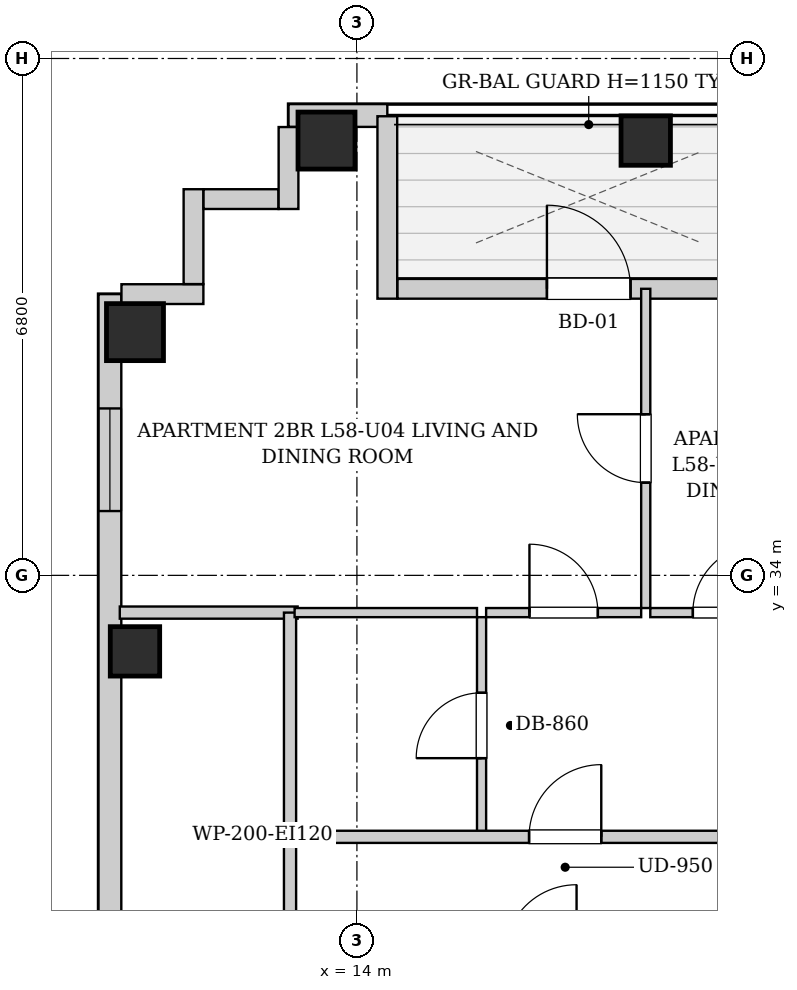
"""IFC4 building model, lengths in metres.
Left out: names, types, materials, properties, quantities, classifications, styles, units other than length and angle.
Written with IfcOpenShell. Run it as: python <this file> out.ifc"""

import sys

from ifc_helpers import new_model, si_unit, direction, frame, frame_2d, origin, origin_2d, place, context, subcontext, project, spatial, rectangle, extrude, element, fill, save


model = new_model("IFC4")
c1 = context("Model", 3, precision=1e-05, world=origin(), true_north=direction((0.0, 1.0)))
c2 = subcontext(c1, "Body", "Model", "MODEL_VIEW")
j1 = project(units=[si_unit("LENGTHUNIT", "METRE"), si_unit("PLANEANGLEUNIT", "RADIAN")], contexts=[c1])
p1 = place(None, origin())
s1 = spatial("IfcSite", under=j1, at=p1, CompositionType="ELEMENT")
p2 = place(p1, origin())
s2 = spatial("IfcBuilding", under=s1, at=p2, CompositionType="ELEMENT")
p3 = place(p2, frame((0.0, 0.0, 200.8)))
s3 = spatial("IfcBuildingStorey", under=s2, at=p3, CompositionType="ELEMENT", Elevation=200.8)
p4 = place(p3, frame((13.6, 39.72, 0.0), z_axis=(0.0, 0.0, 1.0), x_axis=(1.0, 0.0, 0.0)))
e1 = element("IfcColumn", 1, at=p4, inside=s3, PredefinedType="COLUMN", context=c2, shape_type="SweptSolid", body=[
    extrude(rectangle(XDim=0.75, YDim=0.75, at=origin_2d()), origin(), (0.0, 0.0, 1.0), 3.3),
])
for number, where, z_axis, x_axis in (
    (2, (17.8, 39.72, 0.0), (0.0, 0.0, 1.0), (1.0, 0.0, 0.0)),
    (3, (11.08, 33.0, 0.0), (0.0, 0.0, 1.0), (1.0, 0.0, 0.0)),
):
    element("IfcColumn", number, at=place(p3, frame(where, z_axis=z_axis, x_axis=x_axis)), inside=s3, PredefinedType="COLUMN", context=c2, shape_type="SweptSolid", body=[
        extrude(rectangle(XDim=0.65, YDim=0.65, at=origin_2d()), origin(), (0.0, 0.0, 1.0), 3.3),
    ])
p5 = place(p3, frame((11.08, 37.2, 0.0), z_axis=(0.0, 0.0, 1.0), x_axis=(1.0, 0.0, 0.0)))
e4 = element("IfcColumn", 4, at=p5, inside=s3, PredefinedType="COLUMN", context=c2, shape_type="SweptSolid", body=[
    extrude(rectangle(XDim=0.75, YDim=0.75, at=origin_2d()), origin(), (0.0, 0.0, 1.0), 3.3),
])
p6 = place(p3, frame((13.1, 40.05, 0.0), z_axis=(0.0, 0.0, 1.0), x_axis=(1.0, 0.0, 0.0)))
e5 = element("IfcWall", 5, at=p6, inside=s3, PredefinedType="SOLIDWALL", context=c2, shape_type="SweptSolid", body=[
    extrude(rectangle(XDim=1.3, YDim=0.3, at=frame_2d((0.65, 0.0))), origin(), (0.0, 0.0, 1.0), 3.04),
])
p7 = place(p3, frame((14.4, 40.04, 0.0), z_axis=(0.0, 0.0, 1.0), x_axis=(0.0, -1.0, 0.0)))
e6 = element("IfcWall", 6, at=p7, inside=s3, PredefinedType="SOLIDWALL", context=c2, shape_type="SweptSolid", body=[
    extrude(rectangle(XDim=2.4, YDim=0.26, at=frame_2d((1.2, 0.0))), origin(), (0.0, 0.0, 1.0), 3.04),
])
p8 = place(p3, frame((14.534, 37.77, 0.0), z_axis=(0.0, 0.0, 1.0), x_axis=(1.0, 0.0, 0.0)))
e7 = element("IfcWall", 7, at=p8, inside=s3, PredefinedType="SOLIDWALL", context=c2, shape_type="SweptSolid", body=[
    extrude(rectangle(XDim=5.032, YDim=0.26, at=frame_2d((2.516, 0.0))), origin(), (0.0, 0.0, 1.0), 3.04),
])
p9 = place(p8, frame((1.966, 0.0, 0.0)))
e8 = element("IfcOpeningElement", 8, at=p9, cuts=e7, PredefinedType="OPENING", context=c2, shape_type="SweptSolid", body=[
    extrude(rectangle(XDim=1.1, YDim=2.0, at=frame_2d((0.55, 1.0))), frame((0.0, 0.14, 0.0), z_axis=(0.0, -1.0, 0.0), x_axis=(1.0, 0.0, 0.0)), (0.0, 0.0, 1.0), 0.28),
])
p10 = place(p3, frame((10.75, 6.3, 0.0), z_axis=(0.0, 0.0, 1.0), x_axis=(0.0, 1.0, 0.0)))
e9 = element("IfcWall", 9, at=p10, inside=s3, PredefinedType="SOLIDWALL", context=c2, shape_type="SweptSolid", body=[
    extrude(rectangle(XDim=31.4, YDim=0.3, at=frame_2d((15.7, 0.0))), origin(), (0.0, 0.0, 1.0), 3.04),
])
p11 = place(p10, frame((1.504, 0.0, 0.55)))
e10 = element("IfcOpeningElement", 10, at=p11, cuts=e9, PredefinedType="OPENING", context=c2, shape_type="SweptSolid", body=[
    extrude(rectangle(XDim=1.35, YDim=1.2, at=frame_2d((0.675, 0.6))), frame((0.0, 0.16, 0.0), z_axis=(0.0, -1.0, 0.0), x_axis=(1.0, 0.0, 0.0)), (0.0, 0.0, 1.0), 0.32),
])
p12 = place(p10, frame((28.546, 0.0, 0.55)))
e11 = element("IfcOpeningElement", 11, at=p12, cuts=e9, PredefinedType="OPENING", context=c2, shape_type="SweptSolid", body=[
    extrude(rectangle(XDim=1.35, YDim=1.2, at=frame_2d((0.675, 0.6))), frame((0.0, 0.16, 0.0), z_axis=(0.0, -1.0, 0.0), x_axis=(1.0, 0.0, 0.0)), (0.0, 0.0, 1.0), 0.32),
])
p13 = place(p10, frame((11.85, 0.0, 0.55)))
e12 = element("IfcOpeningElement", 12, at=p13, cuts=e9, PredefinedType="OPENING", context=c2, shape_type="SweptSolid", body=[
    extrude(rectangle(XDim=1.35, YDim=1.2, at=frame_2d((0.675, 0.6))), frame((0.0, 0.16, 0.0), z_axis=(0.0, -1.0, 0.0), x_axis=(1.0, 0.0, 0.0)), (0.0, 0.0, 1.0), 0.32),
])
p14 = place(p10, frame((9.185, 0.0, 0.55)))
e13 = element("IfcOpeningElement", 13, at=p14, cuts=e9, PredefinedType="OPENING", context=c2, shape_type="SweptSolid", body=[
    extrude(rectangle(XDim=1.35, YDim=1.2, at=frame_2d((0.675, 0.6))), frame((0.0, 0.16, 0.0), z_axis=(0.0, -1.0, 0.0), x_axis=(1.0, 0.0, 0.0)), (0.0, 0.0, 1.0), 0.32),
])
p15 = place(p10, frame((19.006, 0.0, 0.55)))
e14 = element("IfcOpeningElement", 14, at=p15, cuts=e9, PredefinedType="OPENING", context=c2, shape_type="SweptSolid", body=[
    extrude(rectangle(XDim=1.35, YDim=1.2, at=frame_2d((0.675, 0.6))), frame((0.0, 0.16, 0.0), z_axis=(0.0, -1.0, 0.0), x_axis=(1.0, 0.0, 0.0)), (0.0, 0.0, 1.0), 0.32),
])
p16 = place(p10, frame((20.616, 0.0, 0.55)))
e15 = element("IfcOpeningElement", 15, at=p16, cuts=e9, PredefinedType="OPENING", context=c2, shape_type="SweptSolid", body=[
    extrude(rectangle(XDim=1.35, YDim=1.2, at=frame_2d((0.675, 0.6))), frame((0.0, 0.16, 0.0), z_axis=(0.0, -1.0, 0.0), x_axis=(1.0, 0.0, 0.0)), (0.0, 0.0, 1.0), 0.32),
])
p17 = place(p3, frame((10.902, 37.7, 0.0), z_axis=(0.0, 0.0, 1.0), x_axis=(1.0, 0.0, 0.0)))
e16 = element("IfcWall", 16, at=p17, inside=s3, PredefinedType="SOLIDWALL", context=c2, shape_type="SweptSolid", body=[
    extrude(rectangle(XDim=1.078, YDim=0.26, at=frame_2d((0.539, 0.0))), origin(), (0.0, 0.0, 1.0), 3.04),
])
p18 = place(p3, frame((11.85, 37.832, 0.0), z_axis=(0.0, 0.0, 1.0), x_axis=(0.0, 1.0, 0.0)))
e17 = element("IfcWall", 17, at=p18, inside=s3, PredefinedType="SOLIDWALL", context=c2, shape_type="SweptSolid", body=[
    extrude(rectangle(XDim=1.248, YDim=0.26, at=frame_2d((0.624, 0.0))), origin(), (0.0, 0.0, 1.0), 3.04),
])
p19 = place(p3, frame((11.982, 38.95, 0.0), z_axis=(0.0, 0.0, 1.0), x_axis=(1.0, 0.0, 0.0)))
e18 = element("IfcWall", 18, at=p19, inside=s3, PredefinedType="SOLIDWALL", context=c2, shape_type="SweptSolid", body=[
    extrude(rectangle(XDim=0.986, YDim=0.26, at=frame_2d((0.493, 0.0))), origin(), (0.0, 0.0, 1.0), 3.04),
])
p20 = place(p3, frame((13.1, 38.82, 0.0), z_axis=(0.0, 0.0, 1.0), x_axis=(0.0, 1.0, 0.0)))
e19 = element("IfcWall", 19, at=p20, inside=s3, PredefinedType="SOLIDWALL", context=c2, shape_type="SweptSolid", body=[
    extrude(rectangle(XDim=1.078, YDim=0.26, at=frame_2d((0.539, 0.0))), origin(), (0.0, 0.0, 1.0), 3.04),
])
p21 = place(p3, frame((13.12, 28.98, 0.0), z_axis=(0.0, 0.0, 1.0), x_axis=(0.0, 1.0, 0.0)))
e20 = element("IfcWall", 20, at=p21, inside=s3, PredefinedType="PARTITIONING", context=c2, shape_type="SweptSolid", body=[
    extrude(rectangle(XDim=1.58, YDim=0.16, at=frame_2d((0.79, 0.0))), origin(), (0.0, 0.0, 1.0), 3.04),
])
p22 = place(p3, frame((10.88, 33.51, 0.0), z_axis=(0.0, 0.0, 1.0), x_axis=(1.0, 0.0, 0.0)))
e21 = element("IfcWall", 21, at=p22, inside=s3, PredefinedType="PARTITIONING", context=c2, shape_type="SweptSolid", body=[
    extrude(rectangle(XDim=2.34, YDim=0.16, at=frame_2d((1.17, 0.0))), origin(), (0.0, 0.0, 1.0), 3.04),
])
p23 = place(p3, frame((13.12, 30.6, 0.0), z_axis=(0.0, 0.0, 1.0), x_axis=(0.0, 1.0, 0.0)))
e22 = element("IfcWall", 22, at=p23, inside=s3, PredefinedType="PARTITIONING", context=c2, shape_type="SweptSolid", body=[
    extrude(rectangle(XDim=2.91, YDim=0.16, at=frame_2d((1.455, 0.0))), origin(), (0.0, 0.0, 1.0), 3.04),
])
p24 = place(p3, frame((15.64, 30.6, 0.0), z_axis=(0.0, 0.0, 1.0), x_axis=(0.0, 1.0, 0.0)))
e23 = element("IfcWall", 23, at=p24, inside=s3, PredefinedType="PARTITIONING", context=c2, shape_type="SweptSolid", body=[
    extrude(rectangle(XDim=2.85, YDim=0.12, at=frame_2d((1.425, 0.0))), origin(), (0.0, 0.0, 1.0), 3.04),
])
p25 = place(p24, frame((0.995, 0.0, 0.0)))
e24 = element("IfcOpeningElement", 24, at=p25, cuts=e23, PredefinedType="OPENING", context=c2, shape_type="SweptSolid", body=[
    extrude(rectangle(XDim=0.86, YDim=2.05, at=frame_2d((0.43, 1.025))), frame((0.0, 0.07, 0.0), z_axis=(0.0, -1.0, 0.0), x_axis=(1.0, 0.0, 0.0)), (0.0, 0.0, 1.0), 0.14),
])
p26 = place(p3, frame((13.18, 33.51, 0.0), z_axis=(0.0, 0.0, 1.0), x_axis=(1.0, 0.0, 0.0)))
e25 = element("IfcWall", 25, at=p26, inside=s3, PredefinedType="PARTITIONING", context=c2, shape_type="SweptSolid", body=[
    extrude(rectangle(XDim=2.4, YDim=0.12, at=frame_2d((1.2, 0.0))), origin(), (0.0, 0.0, 1.0), 3.04),
])
p27 = place(p3, frame((15.7, 33.51, 0.0), z_axis=(0.0, 0.0, 1.0), x_axis=(1.0, 0.0, 0.0)))
e26 = element("IfcWall", 26, at=p27, inside=s3, PredefinedType="PARTITIONING", context=c2, shape_type="SweptSolid", body=[
    extrude(rectangle(XDim=2.04, YDim=0.12, at=frame_2d((1.02, 0.0))), origin(), (0.0, 0.0, 1.0), 3.04),
])
p28 = place(p27, frame((0.57, 0.0, 0.0)))
e27 = element("IfcOpeningElement", 27, at=p28, cuts=e26, PredefinedType="OPENING", context=c2, shape_type="SweptSolid", body=[
    extrude(rectangle(XDim=0.9, YDim=2.05, at=frame_2d((0.45, 1.025))), frame((0.0, 0.07, 0.0), z_axis=(0.0, -1.0, 0.0), x_axis=(1.0, 0.0, 0.0)), (0.0, 0.0, 1.0), 0.14),
])
p29 = place(p3, frame((17.86, 33.51, 0.0), z_axis=(0.0, 0.0, 1.0), x_axis=(1.0, 0.0, 0.0)))
e28 = element("IfcWall", 28, at=p29, inside=s3, PredefinedType="PARTITIONING", context=c2, shape_type="SweptSolid", body=[
    extrude(rectangle(XDim=2.02, YDim=0.12, at=frame_2d((1.01, 0.0))), origin(), (0.0, 0.0, 1.0), 3.04),
])
p30 = place(p29, frame((0.56, 0.0, 0.0)))
e29 = element("IfcOpeningElement", 29, at=p30, cuts=e28, PredefinedType="OPENING", context=c2, shape_type="SweptSolid", body=[
    extrude(rectangle(XDim=0.9, YDim=2.05, at=frame_2d((0.45, 1.025))), frame((0.0, 0.07, 0.0), z_axis=(0.0, -1.0, 0.0), x_axis=(1.0, 0.0, 0.0)), (0.0, 0.0, 1.0), 0.14),
])
p31 = place(p3, frame((17.8, 33.57, 0.0), z_axis=(0.0, 0.0, 1.0), x_axis=(0.0, 1.0, 0.0)))
e30 = element("IfcWall", 30, at=p31, inside=s3, PredefinedType="PARTITIONING", context=c2, shape_type="SweptSolid", body=[
    extrude(rectangle(XDim=4.2, YDim=0.12, at=frame_2d((2.1, 0.0))), origin(), (0.0, 0.0, 1.0), 2.556),
])
p32 = place(p31, frame((1.65, 0.0, 0.0)))
e31 = element("IfcOpeningElement", 31, at=p32, cuts=e30, PredefinedType="OPENING", context=c2, shape_type="SweptSolid", body=[
    extrude(rectangle(XDim=0.9, YDim=2.05, at=frame_2d((0.45, 1.025))), frame((0.0, 0.07, 0.0), z_axis=(0.0, -1.0, 0.0), x_axis=(1.0, 0.0, 0.0)), (0.0, 0.0, 1.0), 0.14),
])
p33 = place(p3, frame((13.15, 30.56, 0.0), z_axis=(0.0, 0.0, 1.0), x_axis=(1.0, 0.0, 0.0)))
e32 = element("IfcWall", 32, at=p33, inside=s3, PredefinedType="PARTITIONING", context=c2, shape_type="SweptSolid", body=[
    extrude(rectangle(XDim=24.6, YDim=0.16, at=frame_2d((12.3, 0.0))), origin(), (0.0, 0.0, 1.0), 3.04),
])
p34 = place(p33, frame((3.115, 0.0, 0.0)))
e33 = element("IfcOpeningElement", 33, at=p34, cuts=e32, PredefinedType="OPENING", context=c2, shape_type="SweptSolid", body=[
    extrude(rectangle(XDim=0.95, YDim=2.1, at=frame_2d((0.475, 1.05))), frame((0.0, 0.09, 0.0), z_axis=(0.0, -1.0, 0.0), x_axis=(1.0, 0.0, 0.0)), (0.0, 0.0, 1.0), 0.18),
])
p35 = place(p33, frame((21.55, 0.0, 0.0)))
e34 = element("IfcOpeningElement", 34, at=p35, cuts=e32, PredefinedType="OPENING", context=c2, shape_type="SweptSolid", body=[
    extrude(rectangle(XDim=0.95, YDim=2.1, at=frame_2d((0.475, 1.05))), frame((0.0, 0.09, 0.0), z_axis=(0.0, -1.0, 0.0), x_axis=(1.0, 0.0, 0.0)), (0.0, 0.0, 1.0), 0.18),
])
p36 = place(p25, origin())
e35 = element("IfcDoor", 35, at=p36, inside=s3, OperationType="SINGLE_SWING_LEFT", PredefinedType="DOOR", context=c2, shape_type="SweptSolid", body=[
    extrude(rectangle(XDim=0.86, YDim=2.05, at=frame_2d((0.43, 1.025))), frame((0.0, 0.025, 0.0), z_axis=(0.0, -1.0, 0.0), x_axis=(1.0, 0.0, 0.0)), (0.0, 0.0, 1.0), 0.05),
])
fill(e24, e35)
p37 = place(p28, origin())
e36 = element("IfcDoor", 36, at=p37, inside=s3, OperationType="SINGLE_SWING_LEFT", PredefinedType="DOOR", context=c2, shape_type="SweptSolid", body=[
    extrude(rectangle(XDim=0.9, YDim=2.05, at=frame_2d((0.45, 1.025))), frame((0.0, 0.025, 0.0), z_axis=(0.0, -1.0, 0.0), x_axis=(1.0, 0.0, 0.0)), (0.0, 0.0, 1.0), 0.05),
])
fill(e27, e36)
p38 = place(p30, origin())
e37 = element("IfcDoor", 37, at=p38, inside=s3, OperationType="SINGLE_SWING_RIGHT", PredefinedType="DOOR", context=c2, shape_type="SweptSolid", body=[
    extrude(rectangle(XDim=0.9, YDim=2.05, at=frame_2d((0.45, 1.025))), frame((0.0, 0.025, 0.0), z_axis=(0.0, -1.0, 0.0), x_axis=(1.0, 0.0, 0.0)), (0.0, 0.0, 1.0), 0.05),
])
fill(e29, e37)
p39 = place(p32, origin())
e38 = element("IfcDoor", 38, at=p39, inside=s3, OperationType="SINGLE_SWING_RIGHT", PredefinedType="DOOR", context=c2, shape_type="SweptSolid", body=[
    extrude(rectangle(XDim=0.9, YDim=2.05, at=frame_2d((0.45, 1.025))), frame((0.0, 0.025, 0.0), z_axis=(0.0, -1.0, 0.0), x_axis=(1.0, 0.0, 0.0)), (0.0, 0.0, 1.0), 0.05),
])
fill(e31, e38)
p40 = place(p34, origin())
e39 = element("IfcDoor", 39, at=p40, inside=s3, OperationType="SINGLE_SWING_RIGHT", PredefinedType="DOOR", context=c2, shape_type="SweptSolid", body=[
    extrude(rectangle(XDim=0.95, YDim=2.1, at=frame_2d((0.475, 1.05))), frame((0.0, 0.025, 0.0), z_axis=(0.0, -1.0, 0.0), x_axis=(1.0, 0.0, 0.0)), (0.0, 0.0, 1.0), 0.05),
])
fill(e33, e39)
p41 = place(p9, origin())
e40 = element("IfcDoor", 40, at=p41, inside=s3, OperationType="SINGLE_SWING_LEFT", PredefinedType="DOOR", context=c2, shape_type="SweptSolid", body=[
    extrude(rectangle(XDim=1.1, YDim=2.0, at=frame_2d((0.55, 1.0))), frame((0.0, 0.025, 0.0), z_axis=(0.0, -1.0, 0.0), x_axis=(1.0, 0.0, 0.0)), (0.0, 0.0, 1.0), 0.05),
])
fill(e8, e40)
p42 = place(p12, origin())
e41 = element("IfcWindow", 41, at=p42, inside=s3, PartitioningType="SINGLE_PANEL", PredefinedType="WINDOW", context=c2, shape_type="SweptSolid", body=[
    extrude(rectangle(XDim=1.35, YDim=1.2, at=frame_2d((0.675, 0.6))), frame((0.0, 0.03, 0.0), z_axis=(0.0, -1.0, 0.0), x_axis=(1.0, 0.0, 0.0)), (0.0, 0.0, 1.0), 0.06),
])
fill(e11, e41)
save(model, sys.argv[1])
